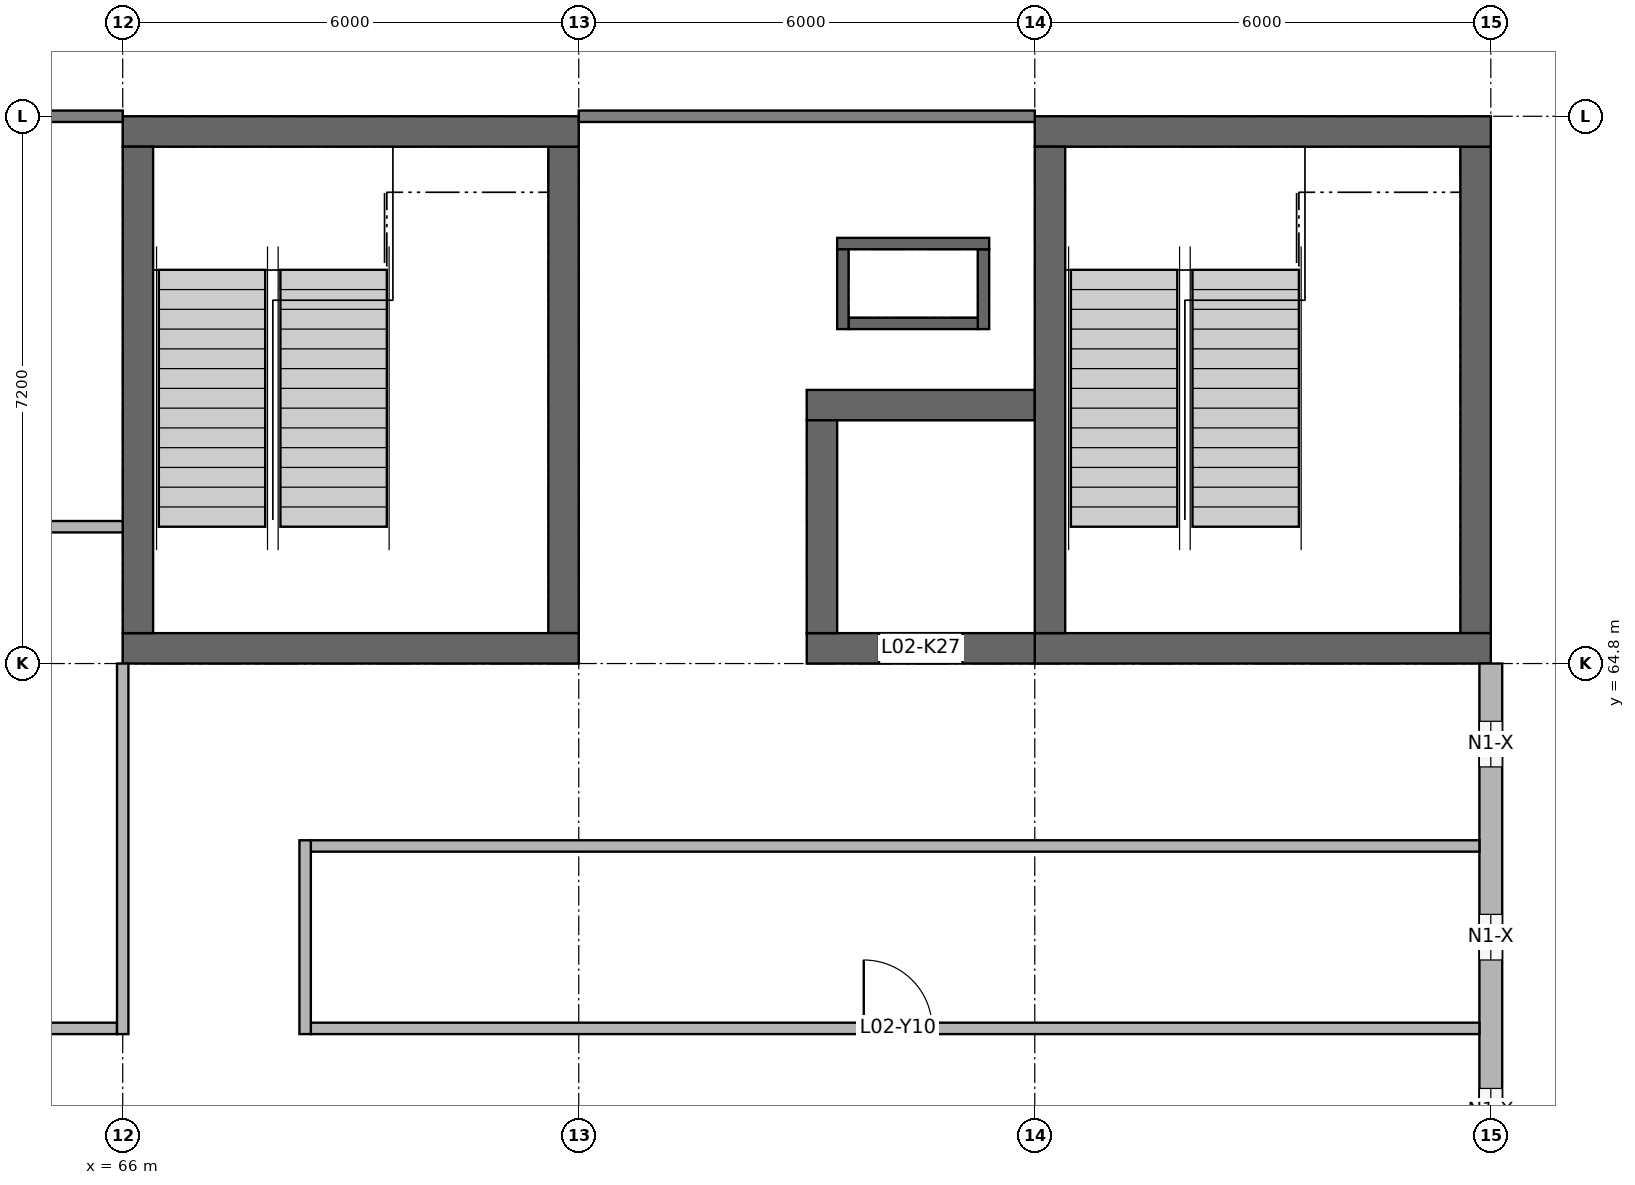
"""IFC4 building model, lengths in metres.
Left out: names, types, materials, properties, quantities, classifications, styles, units other than length and angle.
Written with IfcOpenShell. Run it as: python <this file> out.ifc"""

import sys

from ifc_helpers import new_model, si_unit, direction, frame, frame_2d, origin, place, context, subcontext, project, spatial, rectangle, extrude, element, fill, save


model = new_model("IFC4")
c1 = context("Model", 3, precision=1e-05, world=origin(), true_north=direction((0.0, 1.0)))
c2 = subcontext(c1, "Body", "Model", "MODEL_VIEW")
j1 = project(units=[si_unit("LENGTHUNIT", "METRE"), si_unit("PLANEANGLEUNIT", "RADIAN")], contexts=[c1])
p1 = place(None, origin())
s1 = spatial("IfcSite", under=j1, at=p1, CompositionType="ELEMENT")
p2 = place(p1, origin())
s2 = spatial("IfcBuilding", under=s1, at=p2, CompositionType="ELEMENT")
p3 = place(p2, frame((0.0, 0.0, 8.4)))
s3 = spatial("IfcBuildingStorey", under=s2, at=p3, CompositionType="ELEMENT", Elevation=8.4)
p4 = place(p3, frame((78.0, 65.0, 0.0), z_axis=(0.0, 0.0, 1.0), x_axis=(1.0, 0.0, 0.0)))
e1 = element("IfcWall", 1, at=p4, inside=s3, PredefinedType="SHEAR", context=c2, shape_type="SweptSolid", body=[
    extrude(rectangle(XDim=6.0, YDim=0.4, at=frame_2d((3.0, 0.0))), origin(), (0.0, 0.0, 1.0), 4.0),
])
p5 = place(p4, frame((2.4, 0.0, 0.0)))
e2 = element("IfcOpeningElement", 2, at=p5, cuts=e1, PredefinedType="OPENING", context=c2, shape_type="SweptSolid", body=[
    extrude(rectangle(XDim=1.2, YDim=2.1, at=frame_2d((0.6, 1.05))), frame((0.0, 0.21, 0.0), z_axis=(0.0, -1.0, 0.0), x_axis=(1.0, 0.0, 0.0)), (0.0, 0.0, 1.0), 0.42),
])
p6 = place(p3, frame((78.0, 71.8, 0.0), z_axis=(0.0, 0.0, 1.0), x_axis=(1.0, 0.0, 0.0)))
e3 = element("IfcWall", 3, at=p6, inside=s3, PredefinedType="SHEAR", context=c2, shape_type="SweptSolid", body=[
    extrude(rectangle(XDim=6.0, YDim=0.4, at=frame_2d((3.0, 0.0))), origin(), (0.0, 0.0, 1.0), 4.0),
])
p7 = place(p6, frame((3.7, 0.0, 0.0)))
e4 = element("IfcOpeningElement", 4, at=p7, cuts=e3, PredefinedType="OPENING", context=c2, shape_type="SweptSolid", body=[
    extrude(rectangle(XDim=1.4, YDim=2.1, at=frame_2d((0.7, 1.05))), frame((0.0, 0.21, 0.0), z_axis=(0.0, -1.0, 0.0), x_axis=(1.0, 0.0, 0.0)), (0.0, 0.0, 1.0), 0.42),
])
for number, where, z_axis, x_axis in (
    (5, (78.2, 65.2, 0.0), (0.0, 0.0, 1.0), (0.0, 1.0, 0.0)),
    (6, (83.8, 65.2, 0.0), (0.0, 0.0, 1.0), (0.0, 1.0, 0.0)),
):
    element("IfcWall", number, at=place(p3, frame(where, z_axis=z_axis, x_axis=x_axis)), inside=s3, PredefinedType="SHEAR", context=c2, shape_type="SweptSolid", body=[
        extrude(rectangle(XDim=6.4, YDim=0.4, at=frame_2d((3.2, 0.0))), origin(), (0.0, 0.0, 1.0), 4.0),
    ])
p8 = place(p3, frame((75.0, 65.0, 0.0), z_axis=(0.0, 0.0, 1.0), x_axis=(1.0, 0.0, 0.0)))
e7 = element("IfcWall", 7, at=p8, inside=s3, PredefinedType="SHEAR", context=c2, shape_type="SweptSolid", body=[
    extrude(rectangle(XDim=3.0, YDim=0.4, at=frame_2d((1.5, 0.0))), origin(), (0.0, 0.0, 1.0), 4.2),
])
p9 = place(p8, frame((0.95, 0.0, 0.0)))
e8 = element("IfcOpeningElement", 8, at=p9, cuts=e7, PredefinedType="OPENING", context=c2, shape_type="SweptSolid", body=[
    extrude(rectangle(XDim=1.1, YDim=2.1, at=frame_2d((0.55, 1.05))), frame((0.0, 0.21, 0.0), z_axis=(0.0, -1.0, 0.0), x_axis=(1.0, 0.0, 0.0)), (0.0, 0.0, 1.0), 0.42),
])
p10 = place(p3, frame((75.0, 68.2, 0.0), z_axis=(0.0, 0.0, 1.0), x_axis=(1.0, 0.0, 0.0)))
e9 = element("IfcWall", 9, at=p10, inside=s3, PredefinedType="SHEAR", context=c2, shape_type="SweptSolid", body=[
    extrude(rectangle(XDim=3.0, YDim=0.4, at=frame_2d((1.5, 0.0))), origin(), (0.0, 0.0, 1.0), 4.2),
])
p11 = place(p3, frame((75.2, 65.2, 0.0), z_axis=(0.0, 0.0, 1.0), x_axis=(0.0, 1.0, 0.0)))
e10 = element("IfcWall", 10, at=p11, inside=s3, PredefinedType="SHEAR", context=c2, shape_type="SweptSolid", body=[
    extrude(rectangle(XDim=2.8, YDim=0.4, at=frame_2d((1.4, 0.0))), origin(), (0.0, 0.0, 1.0), 4.2),
])
p12 = place(p3, frame((66.0, 65.0, 0.0), z_axis=(0.0, 0.0, 1.0), x_axis=(1.0, 0.0, 0.0)))
e11 = element("IfcWall", 11, at=p12, inside=s3, PredefinedType="SHEAR", context=c2, shape_type="SweptSolid", body=[
    extrude(rectangle(XDim=6.0, YDim=0.4, at=frame_2d((3.0, 0.0))), origin(), (0.0, 0.0, 1.0), 4.0),
])
p13 = place(p12, frame((2.4, 0.0, 0.0)))
e12 = element("IfcOpeningElement", 12, at=p13, cuts=e11, PredefinedType="OPENING", context=c2, shape_type="SweptSolid", body=[
    extrude(rectangle(XDim=1.2, YDim=2.1, at=frame_2d((0.6, 1.05))), frame((0.0, 0.21, 0.0), z_axis=(0.0, -1.0, 0.0), x_axis=(1.0, 0.0, 0.0)), (0.0, 0.0, 1.0), 0.42),
])
p14 = place(p3, frame((66.0, 71.8, 0.0), z_axis=(0.0, 0.0, 1.0), x_axis=(1.0, 0.0, 0.0)))
e13 = element("IfcWall", 13, at=p14, inside=s3, PredefinedType="SHEAR", context=c2, shape_type="SweptSolid", body=[
    extrude(rectangle(XDim=6.0, YDim=0.4, at=frame_2d((3.0, 0.0))), origin(), (0.0, 0.0, 1.0), 4.0),
])
p15 = place(p14, frame((3.7, 0.0, 0.0)))
e14 = element("IfcOpeningElement", 14, at=p15, cuts=e13, PredefinedType="OPENING", context=c2, shape_type="SweptSolid", body=[
    extrude(rectangle(XDim=1.4, YDim=2.1, at=frame_2d((0.7, 1.05))), frame((0.0, 0.21, 0.0), z_axis=(0.0, -1.0, 0.0), x_axis=(1.0, 0.0, 0.0)), (0.0, 0.0, 1.0), 0.42),
])
for number, where, z_axis, x_axis in (
    (15, (66.2, 65.2, 0.0), (0.0, 0.0, 1.0), (0.0, 1.0, 0.0)),
    (16, (71.8, 65.2, 0.0), (0.0, 0.0, 1.0), (0.0, 1.0, 0.0)),
):
    element("IfcWall", number, at=place(p3, frame(where, z_axis=z_axis, x_axis=x_axis)), inside=s3, PredefinedType="SHEAR", context=c2, shape_type="SweptSolid", body=[
        extrude(rectangle(XDim=6.4, YDim=0.4, at=frame_2d((3.2, 0.0))), origin(), (0.0, 0.0, 1.0), 4.0),
    ])
for number, where, z_axis, x_axis in (
    (17, (78.0, 65.0, -0.25), (0.0, 0.0, 1.0), (1.0, 0.0, 0.0)),
    (18, (78.0, 71.8, -0.25), (0.0, 0.0, 1.0), (1.0, 0.0, 0.0)),
):
    element("IfcWall", number, at=place(p3, frame(where, z_axis=z_axis, x_axis=x_axis)), inside=s3, PredefinedType="SOLIDWALL", context=c2, shape_type="SweptSolid", body=[
        extrude(rectangle(XDim=6.0, YDim=0.4, at=frame_2d((3.0, 0.0))), origin(), (0.0, 0.0, 1.0), 0.25),
    ])
p16 = place(p3, frame((83.8, 65.2, -0.25), z_axis=(0.0, 0.0, 1.0), x_axis=(0.0, 1.0, 0.0)))
e19 = element("IfcWall", 19, at=p16, inside=s3, PredefinedType="SOLIDWALL", context=c2, shape_type="SweptSolid", body=[
    extrude(rectangle(XDim=6.4, YDim=0.4, at=frame_2d((3.2, 0.0))), origin(), (0.0, 0.0, 1.0), 0.25),
])
for number, where, z_axis, x_axis in (
    (20, (66.0, 65.0, -0.25), (0.0, 0.0, 1.0), (1.0, 0.0, 0.0)),
    (21, (66.0, 71.8, -0.25), (0.0, 0.0, 1.0), (1.0, 0.0, 0.0)),
):
    element("IfcWall", number, at=place(p3, frame(where, z_axis=z_axis, x_axis=x_axis)), inside=s3, PredefinedType="SOLIDWALL", context=c2, shape_type="SweptSolid", body=[
        extrude(rectangle(XDim=6.0, YDim=0.4, at=frame_2d((3.0, 0.0))), origin(), (0.0, 0.0, 1.0), 0.25),
    ])
for number, where, z_axis, x_axis in (
    (22, (66.2, 65.2, -0.25), (0.0, 0.0, 1.0), (0.0, 1.0, 0.0)),
    (23, (71.8, 65.2, -0.25), (0.0, 0.0, 1.0), (0.0, 1.0, 0.0)),
):
    element("IfcWall", number, at=place(p3, frame(where, z_axis=z_axis, x_axis=x_axis)), inside=s3, PredefinedType="SOLIDWALL", context=c2, shape_type="SweptSolid", body=[
        extrude(rectangle(XDim=6.4, YDim=0.4, at=frame_2d((3.2, 0.0))), origin(), (0.0, 0.0, 1.0), 0.25),
    ])
p17 = place(p3, frame((75.4, 69.275, 0.0), z_axis=(0.0, 0.0, 1.0), x_axis=(1.0, 0.0, 0.0)))
e24 = element("IfcWall", 24, at=p17, inside=s3, PredefinedType="SOLIDWALL", context=c2, shape_type="SweptSolid", body=[
    extrude(rectangle(XDim=2.0, YDim=0.15, at=frame_2d((1.0, 0.0))), origin(), (0.0, 0.0, 1.0), 4.2),
])
p18 = place(p3, frame((75.4, 70.325, 0.0), z_axis=(0.0, 0.0, 1.0), x_axis=(1.0, 0.0, 0.0)))
e25 = element("IfcWall", 25, at=p18, inside=s3, PredefinedType="SOLIDWALL", context=c2, shape_type="SweptSolid", body=[
    extrude(rectangle(XDim=2.0, YDim=0.15, at=frame_2d((1.0, 0.0))), origin(), (0.0, 0.0, 1.0), 4.2),
])
p19 = place(p18, frame((0.6, 0.0, 0.0)))
e26 = element("IfcOpeningElement", 26, at=p19, cuts=e25, PredefinedType="OPENING", context=c2, shape_type="SweptSolid", body=[
    extrude(rectangle(XDim=0.8, YDim=2.1, at=frame_2d((0.4, 1.05))), frame((0.0, 0.085, 0.0), z_axis=(0.0, -1.0, 0.0), x_axis=(1.0, 0.0, 0.0)), (0.0, 0.0, 1.0), 0.17),
])
for number, where, z_axis, x_axis in (
    (27, (75.475, 69.35, 0.0), (0.0, 0.0, 1.0), (0.0, 1.0, 0.0)),
    (28, (77.325, 69.35, 0.0), (0.0, 0.0, 1.0), (0.0, 1.0, 0.0)),
):
    element("IfcWall", number, at=place(p3, frame(where, z_axis=z_axis, x_axis=x_axis)), inside=s3, PredefinedType="SOLIDWALL", context=c2, shape_type="SweptSolid", body=[
        extrude(rectangle(XDim=0.9, YDim=0.15, at=frame_2d((0.45, 0.0))), origin(), (0.0, 0.0, 1.0), 4.2),
    ])
p20 = place(p3, frame((75.55, 69.275, -0.25), z_axis=(0.0, 0.0, 1.0), x_axis=(1.0, 0.0, 0.0)))
e29 = element("IfcWall", 29, at=p20, inside=s3, PredefinedType="SOLIDWALL", context=c2, shape_type="SweptSolid", body=[
    extrude(rectangle(XDim=1.7, YDim=0.15, at=frame_2d((0.85, 0.0))), origin(), (0.0, 0.0, 1.0), 0.25),
])
p21 = place(p3, frame((75.4, 70.325, -0.25), z_axis=(0.0, 0.0, 1.0), x_axis=(1.0, 0.0, 0.0)))
e30 = element("IfcWall", 30, at=p21, inside=s3, PredefinedType="SOLIDWALL", context=c2, shape_type="SweptSolid", body=[
    extrude(rectangle(XDim=2.0, YDim=0.15, at=frame_2d((1.0, 0.0))), origin(), (0.0, 0.0, 1.0), 0.25),
])
for number, where, z_axis, x_axis in (
    (31, (75.475, 69.2, -0.25), (0.0, 0.0, 1.0), (0.0, 1.0, 0.0)),
    (32, (77.325, 69.2, -0.25), (0.0, 0.0, 1.0), (0.0, 1.0, 0.0)),
):
    element("IfcWall", number, at=place(p3, frame(where, z_axis=z_axis, x_axis=x_axis)), inside=s3, PredefinedType="SOLIDWALL", context=c2, shape_type="SweptSolid", body=[
        extrude(rectangle(XDim=1.05, YDim=0.15, at=frame_2d((0.525, 0.0))), origin(), (0.0, 0.0, 1.0), 0.25),
    ])
p22 = place(p3, frame((84.0, 58.1, 0.0), z_axis=(0.0, 0.0, 1.0), x_axis=(0.0, 1.0, 0.0)))
e33 = element("IfcWall", 33, at=p22, inside=s3, PredefinedType="SOLIDWALL", context=c2, shape_type="SweptSolid", body=[
    extrude(rectangle(XDim=6.7, YDim=0.3, at=frame_2d((3.35, 0.0))), origin(), (0.0, 0.0, 1.0), 3.1),
])
p23 = place(p22, frame((0.51, 0.0, 0.9)))
e34 = element("IfcOpeningElement", 34, at=p23, cuts=e33, PredefinedType="OPENING", context=c2, shape_type="SweptSolid", body=[
    extrude(rectangle(XDim=0.6, YDim=1.9, at=frame_2d((0.3, 0.95))), frame((0.0, 0.16, 0.0), z_axis=(0.0, -1.0, 0.0), x_axis=(1.0, 0.0, 0.0)), (0.0, 0.0, 1.0), 0.32),
])
p24 = place(p22, frame((2.8, 0.0, 0.9)))
e35 = element("IfcOpeningElement", 35, at=p24, cuts=e33, PredefinedType="OPENING", context=c2, shape_type="SweptSolid", body=[
    extrude(rectangle(XDim=0.6, YDim=1.9, at=frame_2d((0.3, 0.95))), frame((0.0, 0.16, 0.0), z_axis=(0.0, -1.0, 0.0), x_axis=(1.0, 0.0, 0.0)), (0.0, 0.0, 1.0), 0.32),
])
p25 = place(p22, frame((5.34, 0.0, 0.9)))
e36 = element("IfcOpeningElement", 36, at=p25, cuts=e33, PredefinedType="OPENING", context=c2, shape_type="SweptSolid", body=[
    extrude(rectangle(XDim=0.6, YDim=1.9, at=frame_2d((0.3, 0.95))), frame((0.0, 0.16, 0.0), z_axis=(0.0, -1.0, 0.0), x_axis=(1.0, 0.0, 0.0)), (0.0, 0.0, 1.0), 0.32),
])
p26 = place(p3, frame((66.0, 59.925, 0.0), z_axis=(0.0, 0.0, 1.0), x_axis=(0.0, 1.0, 0.0)))
e37 = element("IfcWall", 37, at=p26, inside=s3, PredefinedType="PARTITIONING", context=c2, shape_type="SweptSolid", body=[
    extrude(rectangle(XDim=4.875, YDim=0.15, at=frame_2d((2.438, 0.0))), origin(), (0.0, 0.0, 1.0), 4.0),
])
p27 = place(p3, frame((68.4, 59.925, 0.0), z_axis=(0.0, 0.0, 1.0), x_axis=(0.0, 1.0, 0.0)))
e38 = element("IfcWall", 38, at=p27, inside=s3, PredefinedType="PARTITIONING", context=c2, shape_type="SweptSolid", body=[
    extrude(rectangle(XDim=2.55, YDim=0.15, at=frame_2d((1.275, 0.0))), origin(), (0.0, 0.0, 1.0), 4.0),
])
p28 = place(p3, frame((50.475, 60.0, 0.0), z_axis=(0.0, 0.0, 1.0), x_axis=(1.0, 0.0, 0.0)))
e39 = element("IfcWall", 39, at=p28, inside=s3, PredefinedType="PARTITIONING", context=c2, shape_type="SweptSolid", body=[
    extrude(rectangle(XDim=15.45, YDim=0.15, at=frame_2d((7.725, 0.0))), origin(), (0.0, 0.0, 1.0), 3.1),
])
p29 = place(p28, frame((7.125, 0.0, 0.0)))
e40 = element("IfcOpeningElement", 40, at=p29, cuts=e39, PredefinedType="OPENING", context=c2, shape_type="SweptSolid", body=[
    extrude(rectangle(XDim=1.2, YDim=2.1, at=frame_2d((0.6, 1.05))), frame((0.0, 0.085, 0.0), z_axis=(0.0, -1.0, 0.0), x_axis=(1.0, 0.0, 0.0)), (0.0, 0.0, 1.0), 0.17),
])
p30 = place(p3, frame((68.475, 60.0, 0.0), z_axis=(0.0, 0.0, 1.0), x_axis=(1.0, 0.0, 0.0)))
e41 = element("IfcWall", 41, at=p30, inside=s3, PredefinedType="PARTITIONING", context=c2, shape_type="SweptSolid", body=[
    extrude(rectangle(XDim=15.375, YDim=0.15, at=frame_2d((7.688, 0.0))), origin(), (0.0, 0.0, 1.0), 4.0),
])
p31 = place(p30, frame((7.275, 0.0, 0.0)))
e42 = element("IfcOpeningElement", 42, at=p31, cuts=e41, PredefinedType="OPENING", context=c2, shape_type="SweptSolid", body=[
    extrude(rectangle(XDim=0.9, YDim=2.1, at=frame_2d((0.45, 1.05))), frame((0.0, 0.085, 0.0), z_axis=(0.0, -1.0, 0.0), x_axis=(1.0, 0.0, 0.0)), (0.0, 0.0, 1.0), 0.17),
])
p32 = place(p3, frame((68.475, 62.4, 0.0), z_axis=(0.0, 0.0, 1.0), x_axis=(1.0, 0.0, 0.0)))
e43 = element("IfcWall", 43, at=p32, inside=s3, PredefinedType="PARTITIONING", context=c2, shape_type="SweptSolid", body=[
    extrude(rectangle(XDim=15.375, YDim=0.15, at=frame_2d((7.688, 0.0))), origin(), (0.0, 0.0, 1.0), 4.0),
])
p33 = place(p3, frame((50.475, 66.6, 0.0), z_axis=(0.0, 0.0, 1.0), x_axis=(1.0, 0.0, 0.0)))
e44 = element("IfcWall", 44, at=p33, inside=s3, PredefinedType="PARTITIONING", context=c2, shape_type="SweptSolid", body=[
    extrude(rectangle(XDim=15.525, YDim=0.15, at=frame_2d((7.762, 0.0))), origin(), (0.0, 0.0, 1.0), 3.1),
])
p34 = place(p23, origin())
e45 = element("IfcWindow", 45, at=p34, inside=s3, PartitioningType="SINGLE_PANEL", PredefinedType="WINDOW", context=c2, shape_type="SweptSolid", body=[
    extrude(rectangle(XDim=0.6, YDim=1.9, at=frame_2d((0.3, 0.95))), frame((0.0, 0.03, 0.0), z_axis=(0.0, -1.0, 0.0), x_axis=(1.0, 0.0, 0.0)), (0.0, 0.0, 1.0), 0.06),
])
fill(e34, e45)
p35 = place(p24, origin())
e46 = element("IfcWindow", 46, at=p35, inside=s3, PartitioningType="SINGLE_PANEL", PredefinedType="WINDOW", context=c2, shape_type="SweptSolid", body=[
    extrude(rectangle(XDim=0.6, YDim=1.9, at=frame_2d((0.3, 0.95))), frame((0.0, 0.03, 0.0), z_axis=(0.0, -1.0, 0.0), x_axis=(1.0, 0.0, 0.0)), (0.0, 0.0, 1.0), 0.06),
])
fill(e35, e46)
p36 = place(p25, origin())
e47 = element("IfcWindow", 47, at=p36, inside=s3, PartitioningType="SINGLE_PANEL", PredefinedType="WINDOW", context=c2, shape_type="SweptSolid", body=[
    extrude(rectangle(XDim=0.6, YDim=1.9, at=frame_2d((0.3, 0.95))), frame((0.0, 0.03, 0.0), z_axis=(0.0, -1.0, 0.0), x_axis=(1.0, 0.0, 0.0)), (0.0, 0.0, 1.0), 0.06),
])
fill(e36, e47)
p37 = place(p5, origin())
e48 = element("IfcDoor", 48, at=p37, inside=s3, OperationType="SINGLE_SWING_LEFT", PredefinedType="DOOR", context=c2, shape_type="SweptSolid", body=[
    extrude(rectangle(XDim=1.2, YDim=2.1, at=frame_2d((0.6, 1.05))), frame((0.0, 0.025, 0.0), z_axis=(0.0, -1.0, 0.0), x_axis=(1.0, 0.0, 0.0)), (0.0, 0.0, 1.0), 0.05),
])
fill(e2, e48)
p38 = place(p7, origin())
e49 = element("IfcDoor", 49, at=p38, inside=s3, OperationType="DOUBLE_DOOR_SINGLE_SWING", PredefinedType="DOOR", context=c2, shape_type="SweptSolid", body=[
    extrude(rectangle(XDim=1.4, YDim=2.1, at=frame_2d((0.7, 1.05))), frame((0.0, 0.025, 0.0), z_axis=(0.0, -1.0, 0.0), x_axis=(1.0, 0.0, 0.0)), (0.0, 0.0, 1.0), 0.05),
])
fill(e4, e49)
p39 = place(p9, origin())
e50 = element("IfcDoor", 50, at=p39, inside=s3, OperationType="DOUBLE_DOOR_SLIDING", PredefinedType="DOOR", context=c2, shape_type="SweptSolid", body=[
    extrude(rectangle(XDim=1.1, YDim=2.1, at=frame_2d((0.55, 1.05))), frame((0.0, 0.025, 0.0), z_axis=(0.0, -1.0, 0.0), x_axis=(1.0, 0.0, 0.0)), (0.0, 0.0, 1.0), 0.05),
])
fill(e8, e50)
p40 = place(p19, frame((0.8, 0.0, 0.0), z_axis=(0.0, 0.0, 1.0), x_axis=(-1.0, 0.0, 0.0)))
e51 = element("IfcDoor", 51, at=p40, inside=s3, OperationType="SINGLE_SWING_LEFT", PredefinedType="DOOR", context=c2, shape_type="SweptSolid", body=[
    extrude(rectangle(XDim=0.8, YDim=2.1, at=frame_2d((0.4, 1.05))), frame((0.0, 0.025, 0.0), z_axis=(0.0, -1.0, 0.0), x_axis=(1.0, 0.0, 0.0)), (0.0, 0.0, 1.0), 0.05),
])
fill(e26, e51)
p41 = place(p13, origin())
e52 = element("IfcDoor", 52, at=p41, inside=s3, OperationType="SINGLE_SWING_LEFT", PredefinedType="DOOR", context=c2, shape_type="SweptSolid", body=[
    extrude(rectangle(XDim=1.2, YDim=2.1, at=frame_2d((0.6, 1.05))), frame((0.0, 0.025, 0.0), z_axis=(0.0, -1.0, 0.0), x_axis=(1.0, 0.0, 0.0)), (0.0, 0.0, 1.0), 0.05),
])
fill(e12, e52)
p42 = place(p15, origin())
e53 = element("IfcDoor", 53, at=p42, inside=s3, OperationType="DOUBLE_DOOR_SINGLE_SWING", PredefinedType="DOOR", context=c2, shape_type="SweptSolid", body=[
    extrude(rectangle(XDim=1.4, YDim=2.1, at=frame_2d((0.7, 1.05))), frame((0.0, 0.025, 0.0), z_axis=(0.0, -1.0, 0.0), x_axis=(1.0, 0.0, 0.0)), (0.0, 0.0, 1.0), 0.05),
])
fill(e14, e53)
p43 = place(p31, origin())
e54 = element("IfcDoor", 54, at=p43, inside=s3, OperationType="SINGLE_SWING_LEFT", PredefinedType="DOOR", context=c2, shape_type="SweptSolid", body=[
    extrude(rectangle(XDim=0.9, YDim=2.1, at=frame_2d((0.45, 1.05))), frame((0.0, 0.025, 0.0), z_axis=(0.0, -1.0, 0.0), x_axis=(1.0, 0.0, 0.0)), (0.0, 0.0, 1.0), 0.05),
])
fill(e42, e54)
save(model, sys.argv[1])
